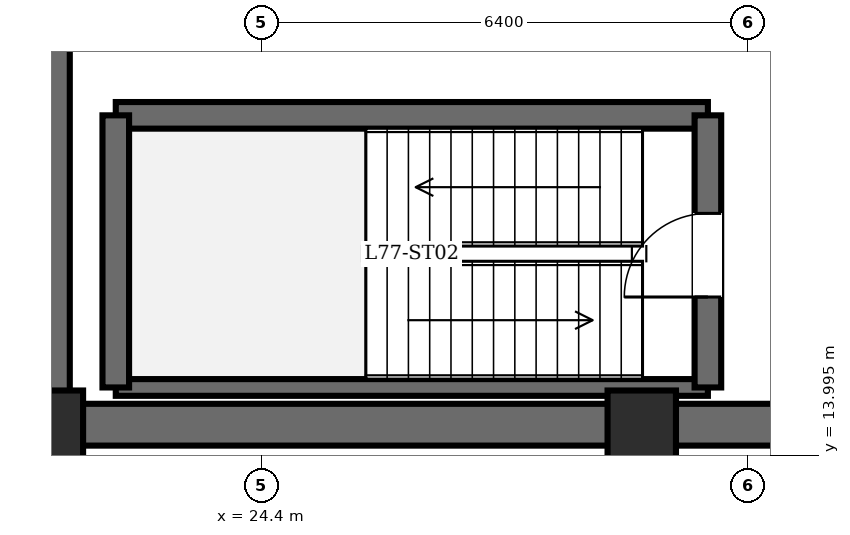
"""IFC4 building model, lengths in metres.
Left out: names, types, materials, properties, quantities, classifications, styles, units other than length and angle.
Written with IfcOpenShell. Run it as: python <this file> out.ifc"""

import sys

from ifc_helpers import new_model, si_unit, direction, frame, frame_2d, origin, origin_2d, place, context, subcontext, project, spatial, rectangle, extrude, element, fill, save


model = new_model("IFC4")
c1 = context("Model", 3, precision=1e-05, world=origin(), true_north=direction((0.0, 1.0)))
c2 = subcontext(c1, "Body", "Model", "MODEL_VIEW")
j1 = project(units=[si_unit("LENGTHUNIT", "METRE"), si_unit("PLANEANGLEUNIT", "RADIAN")], contexts=[c1])
p1 = place(None, origin())
s1 = spatial("IfcSite", under=j1, at=p1, CompositionType="ELEMENT")
p2 = place(p1, origin())
s2 = spatial("IfcBuilding", under=s1, at=p2, CompositionType="ELEMENT")
p3 = place(p2, frame((0.0, 0.0, 295.3)))
s3 = spatial("IfcBuildingStorey", under=s2, at=p3, CompositionType="ELEMENT", Elevation=295.3)
for number, where, z_axis, x_axis in (
    (1, (21.6, 14.4, 0.0), (0.0, 0.0, 1.0), (1.0, 0.0, 0.0)),
    (2, (29.4, 14.4, 0.0), (0.0, 0.0, 1.0), (1.0, 0.0, 0.0)),
):
    element("IfcColumn", number, at=place(p3, frame(where, z_axis=z_axis, x_axis=x_axis)), inside=s3, PredefinedType="COLUMN", context=c2, shape_type="SweptSolid", body=[
        extrude(rectangle(XDim=0.9, YDim=0.9, at=origin_2d()), origin(), (0.0, 0.0, 1.0), 5.1),
    ])
p4 = place(p3, frame((21.6, 14.4, 0.0), z_axis=(0.0, 0.0, 1.0), x_axis=(0.0, 1.0, 0.0)))
e3 = element("IfcWall", 3, at=p4, inside=s3, PredefinedType="SHEAR", context=c2, shape_type="SweptSolid", body=[
    extrude(rectangle(XDim=19.2, YDim=0.55, at=frame_2d((9.6, 0.0))), origin(), (0.0, 0.0, 1.0), 4.85),
])
p5 = place(p3, frame((37.2, 14.4, 0.0), z_axis=(0.0, 0.0, 1.0), x_axis=(-1.0, 0.0, 0.0)))
e4 = element("IfcWall", 4, at=p5, inside=s3, PredefinedType="SHEAR", context=c2, shape_type="SweptSolid", body=[
    extrude(rectangle(XDim=15.6, YDim=0.55, at=frame_2d((7.8, 0.0))), origin(), (0.0, 0.0, 1.0), 4.85),
])
p6 = place(p3, frame((22.48, 18.47, 0.0), z_axis=(0.0, 0.0, 1.0), x_axis=(1.0, 0.0, 0.0)))
e5 = element("IfcWall", 5, at=p6, inside=s3, PredefinedType="SOLIDWALL", context=c2, shape_type="SweptSolid", body=[
    extrude(rectangle(XDim=7.79, YDim=0.35, at=frame_2d((3.895, 0.0))), origin(), (0.0, 0.0, 1.0), 4.85),
])
p7 = place(p3, frame((22.48, 14.89, 0.0), z_axis=(0.0, 0.0, 1.0), x_axis=(1.0, 0.0, 0.0)))
e6 = element("IfcWall", 6, at=p7, inside=s3, PredefinedType="PARTITIONING", context=c2, shape_type="SweptSolid", body=[
    extrude(rectangle(XDim=7.79, YDim=0.22, at=frame_2d((3.895, 0.0))), origin(), (0.0, 0.0, 1.0), 4.85),
])
p8 = place(p3, frame((22.48, 14.89, 0.0), z_axis=(0.0, 0.0, 1.0), x_axis=(0.0, 1.0, 0.0)))
e7 = element("IfcWall", 7, at=p8, inside=s3, PredefinedType="SOLIDWALL", context=c2, shape_type="SweptSolid", body=[
    extrude(rectangle(XDim=3.58, YDim=0.35, at=frame_2d((1.79, 0.0))), origin(), (0.0, 0.0, 1.0), 4.85),
])
p9 = place(p3, frame((30.27, 14.89, 0.0), z_axis=(0.0, 0.0, 1.0), x_axis=(0.0, 1.0, 0.0)))
e8 = element("IfcWall", 8, at=p9, inside=s3, PredefinedType="SOLIDWALL", context=c2, shape_type="SweptSolid", body=[
    extrude(rectangle(XDim=3.58, YDim=0.35, at=frame_2d((1.79, 0.0))), origin(), (0.0, 0.0, 1.0), 4.85),
])
p10 = place(p9, frame((1.19, 0.0, 0.0)))
e9 = element("IfcOpeningElement", 9, at=p10, cuts=e8, PredefinedType="OPENING", context=c2, shape_type="SweptSolid", body=[
    extrude(rectangle(XDim=1.1, YDim=2.15, at=frame_2d((0.55, 1.075))), frame((0.0, 0.185, 0.0), z_axis=(0.0, -1.0, 0.0), x_axis=(1.0, 0.0, 0.0)), (0.0, 0.0, 1.0), 0.37),
])
p11 = place(p10, origin())
e10 = element("IfcDoor", 10, at=p11, inside=s3, OperationType="SINGLE_SWING_LEFT", PredefinedType="DOOR", context=c2, shape_type="SweptSolid", body=[
    extrude(rectangle(XDim=1.1, YDim=2.15, at=frame_2d((0.55, 1.075))), frame((0.0, 0.025, 0.0), z_axis=(0.0, -1.0, 0.0), x_axis=(1.0, 0.0, 0.0)), (0.0, 0.0, 1.0), 0.05),
])
fill(e9, e10)
save(model, sys.argv[1])
